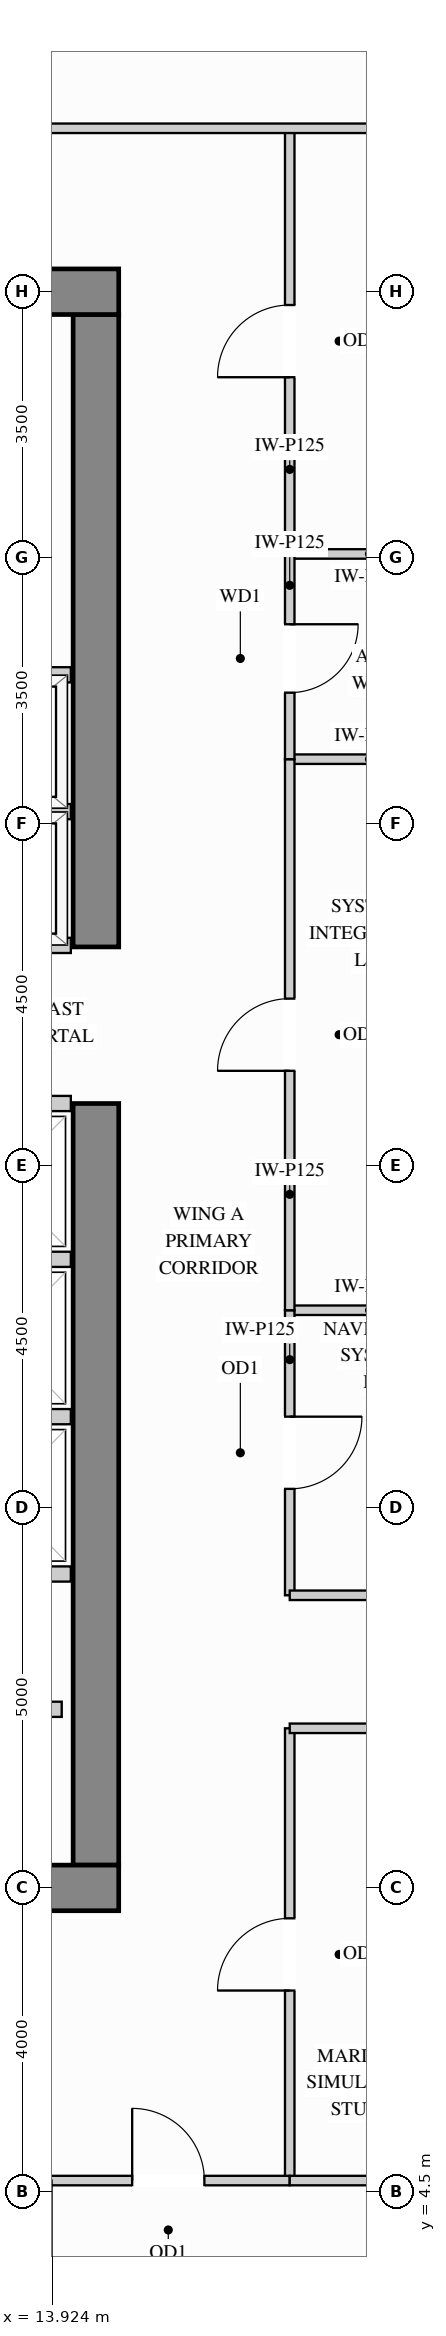
"""IFC4 building model, lengths in metres.
Left out: names, types, materials, properties, quantities, classifications, styles, units other than length and angle.
Written with IfcOpenShell. Run it as: python <this file> out.ifc"""

import sys

from ifc_helpers import new_model, si_unit, direction, frame, frame_2d, origin, place, context, subcontext, project, spatial, rectangle, extrude, source, transform, mapped, element, fill, save


model = new_model("IFC4")
c1 = context("Model", 3, precision=1e-05, world=origin(), true_north=direction((0.0, 1.0)))
c2 = subcontext(c1, "Body", "Model", "MODEL_VIEW")
j1 = project(units=[si_unit("LENGTHUNIT", "METRE"), si_unit("PLANEANGLEUNIT", "RADIAN")], contexts=[c1])
p1 = place(None, origin())
s1 = spatial("IfcSite", under=j1, at=p1, CompositionType="ELEMENT")
p2 = place(p1, origin())
s2 = spatial("IfcBuilding", under=s1, at=p2, CompositionType="ELEMENT")
p3 = place(p2, frame((0.0, 0.0, 168.3)))
s3 = spatial("IfcBuildingStorey", under=s2, at=p3, CompositionType="ELEMENT", Elevation=168.3)
m1 = source(origin(), c2, "Body", "SweptSolid", [
    extrude(rectangle(XDim=10.02, YDim=0.6, at=frame_2d((5.01, 0.0))), origin(), (0.0, 0.0, 1.0), 3.4),
])
p4 = place(p3, frame((14.5, 8.8, 0.0), z_axis=(0.0, 0.0, 1.0), x_axis=(0.0, 1.0, 0.0)))
e1 = element("IfcWall", 1, at=p4, inside=s3, PredefinedType="SHEAR", context=c2, shape_type="MappedRepresentation", body=[
    mapped(m1, transform((0.0, 0.0, 0.0), x_axis=(1.0, 0.0, 0.0), y_axis=(0.0, 1.0, 0.0), z_axis=(0.0, 0.0, 1.0))),
])
m2 = source(origin(), c2, "Body", "SweptSolid", [
    extrude(rectangle(XDim=8.32, YDim=0.6, at=frame_2d((4.16, 0.0))), origin(), (0.0, 0.0, 1.0), 3.4),
])
p5 = place(p3, frame((14.5, 20.88, 0.0), z_axis=(0.0, 0.0, 1.0), x_axis=(0.0, 1.0, 0.0)))
e2 = element("IfcWall", 2, at=p5, inside=s3, PredefinedType="SHEAR", context=c2, shape_type="MappedRepresentation", body=[
    mapped(m2, transform((0.0, 0.0, 0.0), x_axis=(1.0, 0.0, 0.0), y_axis=(0.0, 1.0, 0.0), z_axis=(0.0, 0.0, 1.0))),
])
m3 = source(origin(), c2, "Body", "SweptSolid", [
    extrude(rectangle(XDim=10.6, YDim=0.6, at=frame_2d((5.3, 0.0))), origin(), (0.0, 0.0, 1.0), 3.4),
])
for number, where, z_axis, x_axis in (
    (3, (4.2, 29.5, 0.0), (0.0, 0.0, 1.0), (1.0, 0.0, 0.0)),
    (4, (4.2, 8.5, 0.0), (0.0, 0.0, 1.0), (1.0, 0.0, 0.0)),
):
    element("IfcWall", number, at=place(p3, frame(where, z_axis=z_axis, x_axis=x_axis)), inside=s3, PredefinedType="SHEAR", context=c2, shape_type="MappedRepresentation", body=[
        mapped(m3, transform((0.0, 0.0, 0.0), x_axis=(1.0, 0.0, 0.0), y_axis=(0.0, 1.0, 0.0), z_axis=(0.0, 0.0, 1.0))),
    ])
m4 = source(origin(), c2, "Body", "SweptSolid", [
    extrude(rectangle(XDim=2.1, YDim=0.125, at=frame_2d((1.05, 0.0))), origin(), (0.0, 0.0, 1.0), 3.385),
])
p6 = place(p3, frame((17.05, 16.1, 0.0), z_axis=(0.0, 0.0, 1.0), x_axis=(1.0, 0.0, 0.0)))
e5 = element("IfcWall", 5, at=p6, inside=s3, PredefinedType="PARTITIONING", context=c2, shape_type="MappedRepresentation", body=[
    mapped(m4, transform((0.0, 0.0, 0.0), x_axis=(1.0, 0.0, 0.0), y_axis=(0.0, 1.0, 0.0), z_axis=(0.0, 0.0, 1.0))),
])
m5 = source(origin(), c2, "Body", "SweptSolid", [
    extrude(rectangle(XDim=2.098, YDim=0.125, at=frame_2d((1.049, 0.0))), origin(), (0.0, 0.0, 1.0), 3.385),
])
for number, where, z_axis, x_axis in (
    (6, (17.05, 23.35, 0.0), (0.0, 0.0, 1.0), (1.0, 0.0, 0.0)),
    (7, (17.05, 26.05, 0.0), (0.0, 0.0, 1.0), (1.0, 0.0, 0.0)),
):
    element("IfcWall", number, at=place(p3, frame(where, z_axis=z_axis, x_axis=x_axis)), inside=s3, PredefinedType="PARTITIONING", context=c2, shape_type="MappedRepresentation", body=[
        mapped(m5, transform((0.0, 0.0, 0.0), x_axis=(1.0, 0.0, 0.0), y_axis=(0.0, 1.0, 0.0), z_axis=(0.0, 0.0, 1.0))),
    ])
p7 = place(p3, frame((17.05, 12.35, 0.0), z_axis=(0.0, 0.0, 1.0), x_axis=(0.0, 1.0, 0.0)))
e8 = element("IfcWall", 8, at=p7, inside=s3, PredefinedType="PARTITIONING", context=c2, shape_type="SweptSolid", body=[
    extrude(rectangle(XDim=3.75, YDim=0.125, at=frame_2d((1.875, 0.0))), origin(), (0.0, 0.0, 1.0), 3.385),
])
p8 = place(p7, frame((1.4, 0.0, 0.0)))
e9 = element("IfcOpeningElement", 9, at=p8, cuts=e8, PredefinedType="OPENING", context=c2, shape_type="SweptSolid", body=[
    extrude(rectangle(XDim=0.95, YDim=2.15, at=frame_2d((0.475, 1.075))), frame((0.0, 0.073, 0.0), z_axis=(0.0, -1.0, 0.0), x_axis=(1.0, 0.0, 0.0)), (0.0, 0.0, 1.0), 0.145),
])
p9 = place(p3, frame((17.05, 16.1, 0.0), z_axis=(0.0, 0.0, 1.0), x_axis=(0.0, 1.0, 0.0)))
e10 = element("IfcWall", 10, at=p9, inside=s3, PredefinedType="PARTITIONING", context=c2, shape_type="SweptSolid", body=[
    extrude(rectangle(XDim=7.25, YDim=0.125, at=frame_2d((3.625, 0.0))), origin(), (0.0, 0.0, 1.0), 3.385),
])
p10 = place(p9, frame((3.15, 0.0, 0.0)))
e11 = element("IfcOpeningElement", 11, at=p10, cuts=e10, PredefinedType="OPENING", context=c2, shape_type="SweptSolid", body=[
    extrude(rectangle(XDim=0.95, YDim=2.15, at=frame_2d((0.475, 1.075))), frame((0.0, 0.073, 0.0), z_axis=(0.0, -1.0, 0.0), x_axis=(1.0, 0.0, 0.0)), (0.0, 0.0, 1.0), 0.145),
])
p11 = place(p3, frame((17.05, 26.05, 0.0), z_axis=(0.0, 0.0, 1.0), x_axis=(0.0, 1.0, 0.0)))
e12 = element("IfcWall", 12, at=p11, inside=s3, PredefinedType="PARTITIONING", context=c2, shape_type="SweptSolid", body=[
    extrude(rectangle(XDim=5.6, YDim=0.125, at=frame_2d((2.8, 0.0))), origin(), (0.0, 0.0, 1.0), 3.385),
])
p12 = place(p11, frame((2.325, 0.0, 0.0)))
e13 = element("IfcOpeningElement", 13, at=p12, cuts=e12, PredefinedType="OPENING", context=c2, shape_type="SweptSolid", body=[
    extrude(rectangle(XDim=0.95, YDim=2.15, at=frame_2d((0.475, 1.075))), frame((0.0, 0.073, 0.0), z_axis=(0.0, -1.0, 0.0), x_axis=(1.0, 0.0, 0.0)), (0.0, 0.0, 1.0), 0.145),
])
p13 = place(p3, frame((17.05, 4.65, 0.0), z_axis=(0.0, 0.0, 1.0), x_axis=(0.0, 1.0, 0.0)))
e14 = element("IfcWall", 14, at=p13, inside=s3, PredefinedType="PARTITIONING", context=c2, shape_type="SweptSolid", body=[
    extrude(rectangle(XDim=5.95, YDim=0.125, at=frame_2d((2.975, 0.0))), origin(), (0.0, 0.0, 1.0), 3.385),
])
p14 = place(p13, frame((2.5, 0.0, 0.0)))
e15 = element("IfcOpeningElement", 15, at=p14, cuts=e14, PredefinedType="OPENING", context=c2, shape_type="SweptSolid", body=[
    extrude(rectangle(XDim=0.95, YDim=2.15, at=frame_2d((0.475, 1.075))), frame((0.0, 0.073, 0.0), z_axis=(0.0, -1.0, 0.0), x_axis=(1.0, 0.0, 0.0)), (0.0, 0.0, 1.0), 0.145),
])
p15 = place(p3, frame((17.05, 23.35, 0.0), z_axis=(0.0, 0.0, 1.0), x_axis=(0.0, 1.0, 0.0)))
e16 = element("IfcWall", 16, at=p15, inside=s3, PredefinedType="PARTITIONING", context=c2, shape_type="SweptSolid", body=[
    extrude(rectangle(XDim=2.7, YDim=0.125, at=frame_2d((1.35, 0.0))), origin(), (0.0, 0.0, 1.0), 3.385),
])
p16 = place(p15, frame((0.875, 0.0, 0.0)))
e17 = element("IfcOpeningElement", 17, at=p16, cuts=e16, PredefinedType="OPENING", context=c2, shape_type="SweptSolid", body=[
    extrude(rectangle(XDim=0.9, YDim=2.15, at=frame_2d((0.45, 1.075))), frame((0.0, 0.073, 0.0), z_axis=(0.0, -1.0, 0.0), x_axis=(1.0, 0.0, 0.0)), (0.0, 0.0, 1.0), 0.145),
])
m6 = source(origin(), c2, "Body", "SweptSolid", [
    extrude(rectangle(XDim=12.598, YDim=0.125, at=frame_2d((6.299, 0.0))), origin(), (0.0, 0.0, 1.0), 2.848),
])
p17 = place(p3, frame((6.55, 31.65, 0.0), z_axis=(0.0, 0.0, 1.0), x_axis=(1.0, 0.0, 0.0)))
e18 = element("IfcWall", 18, at=p17, inside=s3, PredefinedType="PARTITIONING", context=c2, shape_type="MappedRepresentation", body=[
    mapped(m6, transform((0.0, 0.0, 0.0), x_axis=(1.0, 0.0, 0.0), y_axis=(0.0, 1.0, 0.0), z_axis=(0.0, 0.0, 1.0))),
])
m7 = source(origin(), c2, "Body", "SweptSolid", [
    extrude(rectangle(XDim=2.45, YDim=0.125, at=frame_2d((1.225, 0.0))), origin(), (0.0, 0.0, 1.0), 3.385),
])
for number, where, z_axis, x_axis in (
    (19, (17.05, 12.35, 0.0), (0.0, 0.0, 1.0), (1.0, 0.0, 0.0)),
    (20, (17.05, 10.6, 0.0), (0.0, 0.0, 1.0), (1.0, 0.0, 0.0)),
):
    element("IfcWall", number, at=place(p3, frame(where, z_axis=z_axis, x_axis=x_axis)), inside=s3, PredefinedType="PARTITIONING", context=c2, shape_type="MappedRepresentation", body=[
        mapped(m7, transform((0.0, 0.0, 0.0), x_axis=(1.0, 0.0, 0.0), y_axis=(0.0, 1.0, 0.0), z_axis=(0.0, 0.0, 1.0))),
    ])
p18 = place(p3, frame((13.854, 4.65, 0.0), z_axis=(0.0, 0.0, 1.0), x_axis=(1.0, 0.0, 0.0)))
e21 = element("IfcWall", 21, at=p18, inside=s3, PredefinedType="PARTITIONING", context=c2, shape_type="SweptSolid", body=[
    extrude(rectangle(XDim=3.196, YDim=0.125, at=frame_2d((1.598, 0.0))), origin(), (0.0, 0.0, 1.0), 2.848),
])
p19 = place(p18, frame((1.123, 0.0, 0.0)))
e22 = element("IfcOpeningElement", 22, at=p19, cuts=e21, PredefinedType="OPENING", context=c2, shape_type="SweptSolid", body=[
    extrude(rectangle(XDim=0.95, YDim=2.15, at=frame_2d((0.475, 1.075))), frame((0.0, 0.073, 0.0), z_axis=(0.0, -1.0, 0.0), x_axis=(1.0, 0.0, 0.0)), (0.0, 0.0, 1.0), 0.145),
])
m8 = source(origin(), c2, "Body", "SweptSolid", [
    extrude(rectangle(XDim=2.098, YDim=0.125, at=frame_2d((1.049, 0.0))), origin(), (0.0, 0.0, 1.0), 2.848),
])
p20 = place(p3, frame((17.05, 4.65, 0.0), z_axis=(0.0, 0.0, 1.0), x_axis=(1.0, 0.0, 0.0)))
e23 = element("IfcWall", 23, at=p20, inside=s3, PredefinedType="PARTITIONING", context=c2, shape_type="MappedRepresentation", body=[
    mapped(m8, transform((0.0, 0.0, 0.0), x_axis=(1.0, 0.0, 0.0), y_axis=(0.0, 1.0, 0.0), z_axis=(0.0, 0.0, 1.0))),
])
m9 = source(origin(), c2, "Body", "SweptSolid", [
    extrude(rectangle(XDim=1.63, YDim=0.2, at=frame_2d((0.815, 0.0))), origin(), (0.0, 0.0, 1.0), 3.385),
])
p21 = place(p3, frame((12.42, 10.85, 0.0), z_axis=(0.0, 0.0, 1.0), x_axis=(1.0, 0.0, 0.0)))
e24 = element("IfcWall", 24, at=p21, inside=s3, PredefinedType="PARTITIONING", context=c2, shape_type="MappedRepresentation", body=[
    mapped(m9, transform((0.0, 0.0, 0.0), x_axis=(1.0, 0.0, 0.0), y_axis=(0.0, 1.0, 0.0), z_axis=(0.0, 0.0, 1.0))),
])
m10 = source(origin(), c2, "Body", "SweptSolid", [
    extrude(rectangle(XDim=2.34, YDim=0.2, at=frame_2d((1.17, 0.0))), origin(), (0.0, 0.0, 1.0), 3.385),
])
for number, where, z_axis, x_axis in (
    (25, (11.83, 22.66, 0.0), (0.0, 0.0, 1.0), (1.0, 0.0, 0.0)),
    (26, (11.83, 20.9, 0.0), (0.0, 0.0, 1.0), (1.0, 0.0, 0.0)),
    (27, (11.83, 24.46, 0.0), (0.0, 0.0, 1.0), (1.0, 0.0, 0.0)),
):
    element("IfcWall", number, at=place(p3, frame(where, z_axis=z_axis, x_axis=x_axis)), inside=s3, PredefinedType="PARTITIONING", context=c2, shape_type="MappedRepresentation", body=[
        mapped(m10, transform((0.0, 0.0, 0.0), x_axis=(1.0, 0.0, 0.0), y_axis=(0.0, 1.0, 0.0), z_axis=(0.0, 0.0, 1.0))),
    ])
m11 = source(origin(), c2, "Body", "SweptSolid", [
    extrude(rectangle(XDim=1.94, YDim=0.2, at=frame_2d((0.97, 0.0))), origin(), (0.0, 0.0, 1.0), 3.385),
])
for number, where, z_axis, x_axis in (
    (28, (12.23, 14.7, 0.0), (0.0, 0.0, 1.0), (1.0, 0.0, 0.0)),
    (29, (12.23, 12.63, 0.0), (0.0, 0.0, 1.0), (1.0, 0.0, 0.0)),
    (30, (12.23, 16.77, 0.0), (0.0, 0.0, 1.0), (1.0, 0.0, 0.0)),
    (31, (12.23, 18.82, 0.0), (0.0, 0.0, 1.0), (1.0, 0.0, 0.0)),
):
    element("IfcWall", number, at=place(p3, frame(where, z_axis=z_axis, x_axis=x_axis)), inside=s3, PredefinedType="PARTITIONING", context=c2, shape_type="MappedRepresentation", body=[
        mapped(m11, transform((0.0, 0.0, 0.0), x_axis=(1.0, 0.0, 0.0), y_axis=(0.0, 1.0, 0.0), z_axis=(0.0, 0.0, 1.0))),
    ])
m12 = source(origin(), c2, "Body", "SweptSolid", [
    extrude(rectangle(XDim=0.95, YDim=2.15, at=frame_2d((0.475, 1.075))), frame((0.0, 0.025, 0.0), z_axis=(0.0, -1.0, 0.0), x_axis=(1.0, 0.0, 0.0)), (0.0, 0.0, 1.0), 0.05),
])
p22 = place(p14, origin())
e32 = element("IfcDoor", 32, at=p22, inside=s3, OperationType="SINGLE_SWING_LEFT", PredefinedType="DOOR", context=c2, shape_type="MappedRepresentation", body=[
    mapped(m12, transform((0.0, 0.0, 0.0), x_axis=(1.0, 0.0, 0.0), y_axis=(0.0, 1.0, 0.0), z_axis=(0.0, 0.0, 1.0))),
])
fill(e15, e32)
p23 = place(p8, origin())
e33 = element("IfcDoor", 33, at=p23, inside=s3, OperationType="SINGLE_SWING_RIGHT", PredefinedType="DOOR", context=c2, shape_type="MappedRepresentation", body=[
    mapped(m12, transform((0.0, 0.0, 0.0), x_axis=(1.0, 0.0, 0.0), y_axis=(0.0, 1.0, 0.0), z_axis=(0.0, 0.0, 1.0))),
])
fill(e9, e33)
p24 = place(p10, origin())
e34 = element("IfcDoor", 34, at=p24, inside=s3, OperationType="SINGLE_SWING_LEFT", PredefinedType="DOOR", context=c2, shape_type="MappedRepresentation", body=[
    mapped(m12, transform((0.0, 0.0, 0.0), x_axis=(1.0, 0.0, 0.0), y_axis=(0.0, 1.0, 0.0), z_axis=(0.0, 0.0, 1.0))),
])
fill(e11, e34)
p25 = place(p12, origin())
e35 = element("IfcDoor", 35, at=p25, inside=s3, OperationType="SINGLE_SWING_LEFT", PredefinedType="DOOR", context=c2, shape_type="MappedRepresentation", body=[
    mapped(m12, transform((0.0, 0.0, 0.0), x_axis=(1.0, 0.0, 0.0), y_axis=(0.0, 1.0, 0.0), z_axis=(0.0, 0.0, 1.0))),
])
fill(e13, e35)
p26 = place(p19, origin())
e36 = element("IfcDoor", 36, at=p26, inside=s3, OperationType="SINGLE_SWING_LEFT", PredefinedType="DOOR", context=c2, shape_type="MappedRepresentation", body=[
    mapped(m12, transform((0.0, 0.0, 0.0), x_axis=(1.0, 0.0, 0.0), y_axis=(0.0, 1.0, 0.0), z_axis=(0.0, 0.0, 1.0))),
])
fill(e22, e36)
m13 = source(origin(), c2, "Body", "SweptSolid", [
    extrude(rectangle(XDim=0.9, YDim=2.15, at=frame_2d((0.45, 1.075))), frame((0.0, 0.025, 0.0), z_axis=(0.0, -1.0, 0.0), x_axis=(1.0, 0.0, 0.0)), (0.0, 0.0, 1.0), 0.05),
])
p27 = place(p16, origin())
e37 = element("IfcDoor", 37, at=p27, inside=s3, OperationType="SINGLE_SWING_RIGHT", PredefinedType="DOOR", context=c2, shape_type="MappedRepresentation", body=[
    mapped(m13, transform((0.0, 0.0, 0.0), x_axis=(1.0, 0.0, 0.0), y_axis=(0.0, 1.0, 0.0), z_axis=(0.0, 0.0, 1.0))),
])
fill(e17, e37)
save(model, sys.argv[1])
